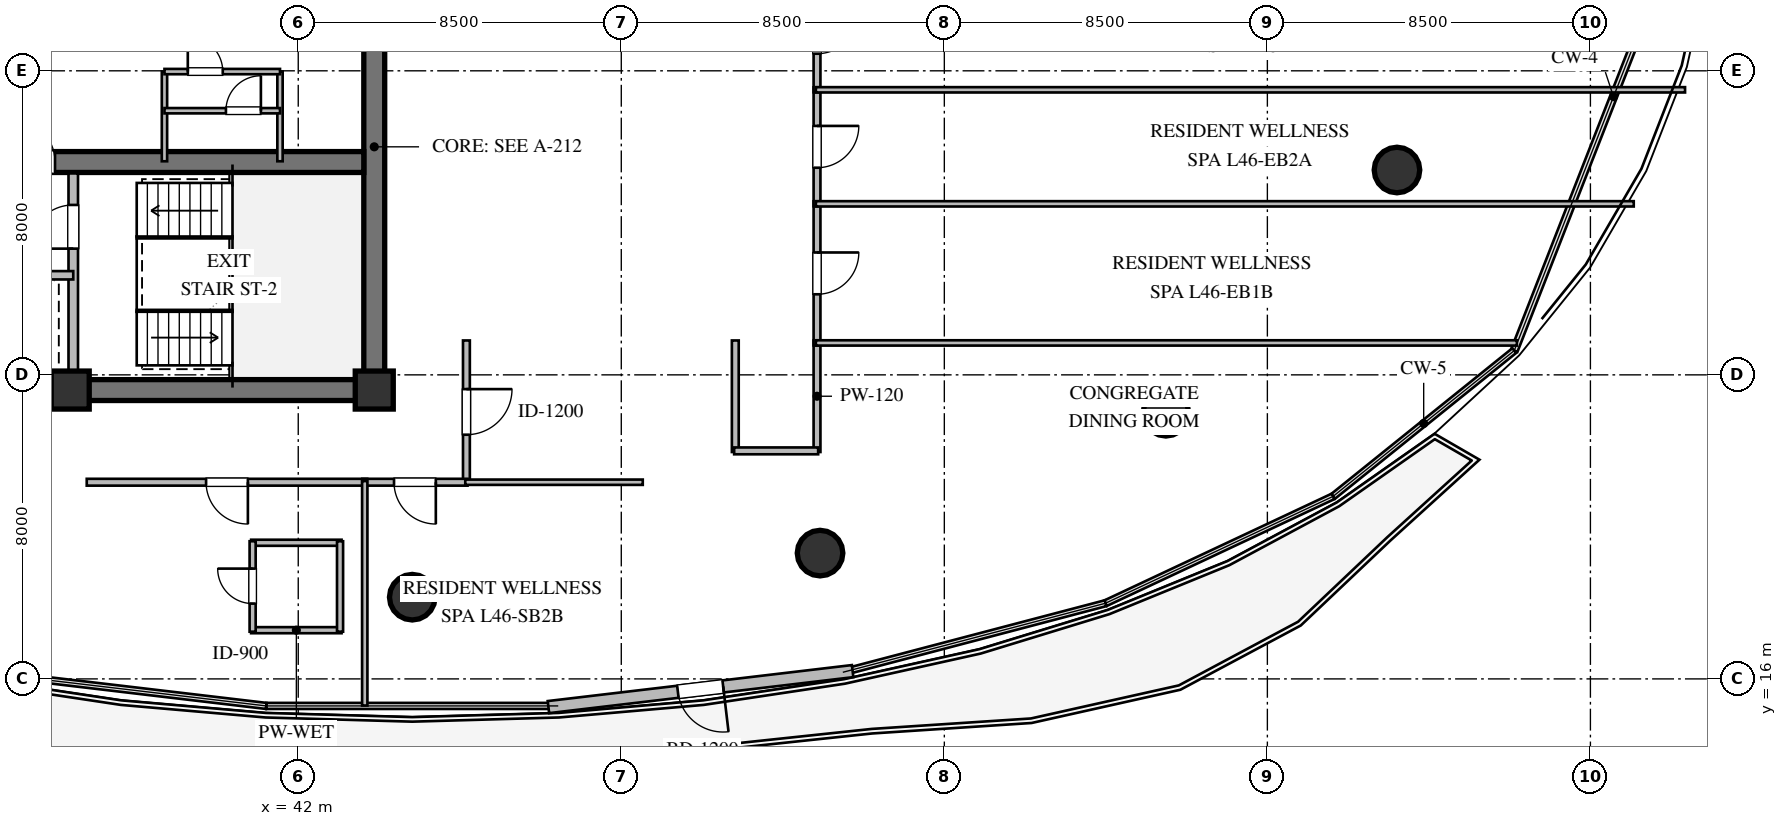
"""IFC4 building model, lengths in metres.
Left out: names, types, materials, properties, quantities, classifications, styles, units other than length and angle.
Written with IfcOpenShell. Run it as: python <this file> out.ifc"""

import sys

from ifc_helpers import new_model, si_unit, direction, frame, frame_2d, origin, origin_2d, place, context, subcontext, project, spatial, rectangle, circle, extrude, element, fill, save


model = new_model("IFC4")
c1 = context("Model", 3, precision=1e-05, world=origin(), true_north=direction((0.0, 1.0)))
c2 = subcontext(c1, "Body", "Model", "MODEL_VIEW")
j1 = project(units=[si_unit("LENGTHUNIT", "METRE"), si_unit("PLANEANGLEUNIT", "RADIAN")], contexts=[c1])
p1 = place(None, origin())
s1 = spatial("IfcSite", under=j1, at=p1, CompositionType="ELEMENT")
p2 = place(p1, origin())
s2 = spatial("IfcBuilding", under=s1, at=p2, CompositionType="ELEMENT")
p3 = place(p2, frame((0.0, 0.0, 174.6)))
s3 = spatial("IfcBuildingStorey", under=s2, at=p3, CompositionType="ELEMENT", Elevation=174.6)
p4 = place(p3, frame((21.725, 23.6, 0.0), z_axis=(0.0, 0.0, 1.0), x_axis=(1.0, 0.0, 0.0)))
e1 = element("IfcWall", 1, at=p4, inside=s3, PredefinedType="SHEAR", context=c2, shape_type="SweptSolid", body=[
    extrude(rectangle(XDim=22.55, YDim=0.55, at=frame_2d((11.275, 0.0))), origin(), (0.0, 0.0, 1.0), 3.36),
])
p5 = place(p3, frame((44.0, 23.875, 0.0), z_axis=(0.0, 0.0, 1.0), x_axis=(0.0, 1.0, 0.0)))
e2 = element("IfcWall", 2, at=p5, inside=s3, PredefinedType="SHEAR", context=c2, shape_type="SweptSolid", body=[
    extrude(rectangle(XDim=12.25, YDim=0.55, at=frame_2d((6.125, 0.0))), origin(), (0.0, 0.0, 1.0), 3.36),
])
p6 = place(p5, frame((8.725, 0.0, 0.0)))
e3 = element("IfcOpeningElement", 3, at=p6, cuts=e2, PredefinedType="OPENING", context=c2, shape_type="SweptSolid", body=[
    extrude(rectangle(XDim=1.5, YDim=2.15, at=frame_2d((0.75, 1.075))), frame((0.0, 0.285, 0.0), z_axis=(0.0, -1.0, 0.0), x_axis=(1.0, 0.0, 0.0)), (0.0, 0.0, 1.0), 0.57),
])
p7 = place(p3, frame((22.275, 29.6, 0.0), z_axis=(0.0, 0.0, 1.0), x_axis=(1.0, 0.0, 0.0)))
e4 = element("IfcWall", 4, at=p7, inside=s3, PredefinedType="SHEAR", context=c2, shape_type="SweptSolid", body=[
    extrude(rectangle(XDim=21.45, YDim=0.55, at=frame_2d((10.725, 0.0))), origin(), (0.0, 0.0, 1.0), 3.36),
])
p8 = place(p7, frame((12.175, 0.0, 0.0)))
e5 = element("IfcOpeningElement", 5, at=p8, cuts=e4, PredefinedType="OPENING", context=c2, shape_type="SweptSolid", body=[
    extrude(rectangle(XDim=1.15, YDim=2.1, at=frame_2d((0.575, 1.05))), frame((0.0, 0.285, 0.0), z_axis=(0.0, -1.0, 0.0), x_axis=(1.0, 0.0, 0.0)), (0.0, 0.0, 1.0), 0.57),
])
for number, where, z_axis, x_axis in (
    (6, (36.0, 23.6, 0.0), (0.0, 0.0, 1.0), (1.0, 0.0, 0.0)),
    (7, (44.0, 23.6, 0.0), (0.0, 0.0, 1.0), (1.0, 0.0, 0.0)),
):
    element("IfcColumn", number, at=place(p3, frame(where, z_axis=z_axis, x_axis=x_axis)), inside=s3, PredefinedType="COLUMN", context=c2, shape_type="SweptSolid", body=[
        extrude(rectangle(XDim=1.0, YDim=1.0, at=origin_2d()), origin(), (0.0, 0.0, 1.0), 3.6),
    ])
for number, where, z_axis, x_axis in (
    (8, (45.0, 18.15, 0.0), (0.0, 0.0, 1.0), (1.0, 0.0, 0.0)),
    (9, (55.73, 19.31, 0.0), (0.0, 0.0, 1.0), (1.0, 0.0, 0.0)),
    (10, (64.83, 22.99, 0.0), (0.0, 0.0, 1.0), (1.0, 0.0, 0.0)),
    (11, (70.91, 29.39, 0.0), (0.0, 0.0, 1.0), (1.0, 0.0, 0.0)),
):
    element("IfcColumn", number, at=place(p3, frame(where, z_axis=z_axis, x_axis=x_axis)), inside=s3, PredefinedType="COLUMN", context=c2, shape_type="SweptSolid", body=[
        extrude(circle(Radius=0.6, at=origin_2d()), origin(), (0.0, 0.0, 1.0), 3.6),
    ])
p9 = place(p3, frame((56.587, 16.205, 0.0), z_axis=(0.0, 0.0, 1.0), x_axis=(-0.993072847957, -0.117500292131, 0.0)))
e12 = element("IfcWall", 12, at=p9, inside=s3, PredefinedType="STANDARD", context=c2, shape_type="SweptSolid", body=[
    extrude(rectangle(XDim=8.06, YDim=0.32, at=frame_2d((4.03, 0.0))), origin(), (0.0, 0.0, 1.0), 3.36),
])
p10 = place(p9, frame((3.43, 0.0, 0.0)))
e13 = element("IfcOpeningElement", 13, at=p10, cuts=e12, PredefinedType="OPENING", context=c2, shape_type="SweptSolid", body=[
    extrude(rectangle(XDim=1.2, YDim=2.15, at=frame_2d((0.6, 1.075))), frame((0.0, 0.17, 0.0), z_axis=(0.0, -1.0, 0.0), x_axis=(1.0, 0.0, 0.0)), (0.0, 0.0, 1.0), 0.34),
])
p11 = place(p3, frame((36.08, 23.9, 0.0), z_axis=(0.0, 0.0, 1.0), x_axis=(0.0, 1.0, 0.0)))
e14 = element("IfcWall", 14, at=p11, inside=s3, PredefinedType="SOLIDWALL", context=c2, shape_type="SweptSolid", body=[
    extrude(rectangle(XDim=5.4, YDim=0.25, at=frame_2d((2.7, 0.0))), origin(), (0.0, 0.0, 1.0), 3.36),
])
p12 = place(p11, frame((3.421, 0.0, 0.0)))
e15 = element("IfcOpeningElement", 15, at=p12, cuts=e14, PredefinedType="OPENING", context=c2, shape_type="SweptSolid", body=[
    extrude(rectangle(XDim=1.15, YDim=2.1, at=frame_2d((0.575, 1.05))), frame((0.0, 0.135, 0.0), z_axis=(0.0, -1.0, 0.0), x_axis=(1.0, 0.0, 0.0)), (0.0, 0.0, 1.0), 0.27),
])
p13 = place(p3, frame((29.92, 26.62, 0.0), z_axis=(0.0, 0.0, 1.0), x_axis=(1.0, 0.0, 0.0)))
e16 = element("IfcWall", 16, at=p13, inside=s3, PredefinedType="SOLIDWALL", context=c2, shape_type="SweptSolid", body=[
    extrude(rectangle(XDim=6.16, YDim=0.22, at=frame_2d((3.08, 0.0))), origin(), (0.0, 0.0, 1.0), 3.36),
])
p14 = place(p13, frame((0.99, 0.0, 0.0)))
e17 = element("IfcOpeningElement", 17, at=p14, cuts=e16, PredefinedType="OPENING", context=c2, shape_type="SweptSolid", body=[
    extrude(rectangle(XDim=1.1, YDim=2.1, at=frame_2d((0.55, 1.05))), frame((0.0, 0.12, 0.0), z_axis=(0.0, -1.0, 0.0), x_axis=(1.0, 0.0, 0.0)), (0.0, 0.0, 1.0), 0.24),
])
p15 = place(p13, frame((4.07, 0.0, 0.0)))
e18 = element("IfcOpeningElement", 18, at=p15, cuts=e16, PredefinedType="OPENING", context=c2, shape_type="SweptSolid", body=[
    extrude(rectangle(XDim=1.1, YDim=2.1, at=frame_2d((0.55, 1.05))), frame((0.0, 0.12, 0.0), z_axis=(0.0, -1.0, 0.0), x_axis=(1.0, 0.0, 0.0)), (0.0, 0.0, 1.0), 0.24),
])
for number, where, z_axis, x_axis in (
    (19, (38.48, 29.62, 0.0), (0.0, 0.0, 1.0), (0.0, 1.0, 0.0)),
    (20, (41.52, 29.62, 0.0), (0.0, 0.0, 1.0), (0.0, 1.0, 0.0)),
):
    element("IfcWall", number, at=place(p3, frame(where, z_axis=z_axis, x_axis=x_axis)), inside=s3, PredefinedType="PARTITIONING", context=c2, shape_type="SweptSolid", body=[
        extrude(rectangle(XDim=2.36, YDim=0.14, at=frame_2d((1.18, 0.0))), origin(), (0.0, 0.0, 1.0), 3.36),
    ])
p16 = place(p3, frame((38.48, 30.95, 0.0), z_axis=(0.0, 0.0, 1.0), x_axis=(1.0, 0.0, 0.0)))
e21 = element("IfcWall", 21, at=p16, inside=s3, PredefinedType="PARTITIONING", context=c2, shape_type="SweptSolid", body=[
    extrude(rectangle(XDim=3.04, YDim=0.14, at=frame_2d((1.52, 0.0))), origin(), (0.0, 0.0, 1.0), 3.36),
])
p17 = place(p16, frame((1.617, 0.0, 0.0)))
e22 = element("IfcOpeningElement", 22, at=p17, cuts=e21, PredefinedType="OPENING", context=c2, shape_type="SweptSolid", body=[
    extrude(rectangle(XDim=0.92, YDim=2.1, at=frame_2d((0.46, 1.05))), frame((0.0, 0.08, 0.0), z_axis=(0.0, -1.0, 0.0), x_axis=(1.0, 0.0, 0.0)), (0.0, 0.0, 1.0), 0.16),
])
p18 = place(p3, frame((38.48, 31.98, 0.0), z_axis=(0.0, 0.0, 1.0), x_axis=(1.0, 0.0, 0.0)))
e23 = element("IfcWall", 23, at=p18, inside=s3, PredefinedType="PARTITIONING", context=c2, shape_type="SweptSolid", body=[
    extrude(rectangle(XDim=3.04, YDim=0.14, at=frame_2d((1.52, 0.0))), origin(), (0.0, 0.0, 1.0), 3.36),
])
p19 = place(p18, frame((0.614, 0.0, 0.0)))
e24 = element("IfcOpeningElement", 24, at=p19, cuts=e23, PredefinedType="OPENING", context=c2, shape_type="SweptSolid", body=[
    extrude(rectangle(XDim=0.92, YDim=2.1, at=frame_2d((0.46, 1.05))), frame((0.0, 0.08, 0.0), z_axis=(0.0, -1.0, 0.0), x_axis=(1.0, 0.0, 0.0)), (0.0, 0.0, 1.0), 0.16),
])
for number, where, z_axis, x_axis in (
    (25, (40.76, 17.282, 0.0), (0.0, 0.0, 1.0), (1.0, 0.0, 0.0)),
    (26, (40.76, 19.582, 0.0), (0.0, 0.0, 1.0), (1.0, 0.0, 0.0)),
):
    element("IfcWall", number, at=place(p3, frame(where, z_axis=z_axis, x_axis=x_axis)), inside=s3, PredefinedType="PLUMBINGWALL", context=c2, shape_type="SweptSolid", body=[
        extrude(rectangle(XDim=2.38, YDim=0.16, at=frame_2d((1.19, 0.0))), origin(), (0.0, 0.0, 1.0), 3.36),
    ])
p20 = place(p3, frame((40.8, 17.242, 0.0), z_axis=(0.0, 0.0, 1.0), x_axis=(0.0, 1.0, 0.0)))
e27 = element("IfcWall", 27, at=p20, inside=s3, PredefinedType="PLUMBINGWALL", context=c2, shape_type="SweptSolid", body=[
    extrude(rectangle(XDim=2.38, YDim=0.16, at=frame_2d((1.19, 0.0))), origin(), (0.0, 0.0, 1.0), 3.36),
])
p21 = place(p20, frame((0.74, 0.0, 0.0)))
e28 = element("IfcOpeningElement", 28, at=p21, cuts=e27, PredefinedType="OPENING", context=c2, shape_type="SweptSolid", body=[
    extrude(rectangle(XDim=0.92, YDim=2.1, at=frame_2d((0.46, 1.05))), frame((0.0, 0.09, 0.0), z_axis=(0.0, -1.0, 0.0), x_axis=(1.0, 0.0, 0.0)), (0.0, 0.0, 1.0), 0.18),
])
p22 = place(p3, frame((43.1, 17.242, 0.0), z_axis=(0.0, 0.0, 1.0), x_axis=(0.0, 1.0, 0.0)))
e29 = element("IfcWall", 29, at=p22, inside=s3, PredefinedType="PLUMBINGWALL", context=c2, shape_type="SweptSolid", body=[
    extrude(rectangle(XDim=2.38, YDim=0.16, at=frame_2d((1.19, 0.0))), origin(), (0.0, 0.0, 1.0), 3.36),
])
p23 = place(p3, frame((46.425, 24.905, 0.0), z_axis=(0.0, 0.0, 1.0), x_axis=(0.0, -1.0, 0.0)))
e30 = element("IfcWall", 30, at=p23, inside=s3, PredefinedType="PARTITIONING", context=c2, shape_type="SweptSolid", body=[
    extrude(rectangle(XDim=3.76, YDim=0.18, at=frame_2d((1.88, 0.0))), origin(), (0.0, 0.0, 1.0), 3.36),
])
p24 = place(p23, frame((1.28, 0.0, 0.0)))
e31 = element("IfcOpeningElement", 31, at=p24, cuts=e30, PredefinedType="OPENING", context=c2, shape_type="SweptSolid", body=[
    extrude(rectangle(XDim=1.2, YDim=2.15, at=frame_2d((0.6, 1.075))), frame((0.0, 0.1, 0.0), z_axis=(0.0, -1.0, 0.0), x_axis=(1.0, 0.0, 0.0)), (0.0, 0.0, 1.0), 0.2),
])
for number, where, z_axis, x_axis in (
    (32, (55.65, 24.905, 0.0), (0.0, 0.0, 1.0), (0.0, -1.0, 0.0)),
    (33, (53.5, 21.97, 0.0), (0.0, 0.0, 1.0), (0.0, 1.0, 0.0)),
):
    element("IfcWall", number, at=place(p3, frame(where, z_axis=z_axis, x_axis=x_axis)), inside=s3, PredefinedType="PARTITIONING", context=c2, shape_type="SweptSolid", body=[
        extrude(rectangle(XDim=2.935, YDim=0.18, at=frame_2d((1.468, 0.0))), origin(), (0.0, 0.0, 1.0), 3.36),
    ])
p25 = place(p3, frame((55.68, 22.0, 0.0), z_axis=(0.0, 0.0, 1.0), x_axis=(-1.0, 0.0, 0.0)))
e34 = element("IfcWall", 34, at=p25, inside=s3, PredefinedType="PARTITIONING", context=c2, shape_type="SweptSolid", body=[
    extrude(rectangle(XDim=2.21, YDim=0.18, at=frame_2d((1.105, 0.0))), origin(), (0.0, 0.0, 1.0), 3.36),
])
p26 = place(p3, frame((55.65, 28.565, 0.0), z_axis=(0.0, 0.0, 1.0), x_axis=(0.0, -1.0, 0.0)))
e35 = element("IfcWall", 35, at=p26, inside=s3, PredefinedType="PARTITIONING", context=c2, shape_type="SweptSolid", body=[
    extrude(rectangle(XDim=3.79, YDim=0.18, at=frame_2d((1.895, 0.0))), origin(), (0.0, 0.0, 1.0), 3.36),
])
p27 = place(p26, frame((1.345, 0.0, 0.0)))
e36 = element("IfcOpeningElement", 36, at=p27, cuts=e35, PredefinedType="OPENING", context=c2, shape_type="SweptSolid", body=[
    extrude(rectangle(XDim=1.1, YDim=2.1, at=frame_2d((0.55, 1.05))), frame((0.0, 0.1, 0.0), z_axis=(0.0, -1.0, 0.0), x_axis=(1.0, 0.0, 0.0)), (0.0, 0.0, 1.0), 0.2),
])
p28 = place(p3, frame((55.65, 31.565, 0.0), z_axis=(0.0, 0.0, 1.0), x_axis=(0.0, -1.0, 0.0)))
e37 = element("IfcWall", 37, at=p28, inside=s3, PredefinedType="PARTITIONING", context=c2, shape_type="SweptSolid", body=[
    extrude(rectangle(XDim=3.13, YDim=0.18, at=frame_2d((1.565, 0.0))), origin(), (0.0, 0.0, 1.0), 3.36),
])
p29 = place(p28, frame((1.015, 0.0, 0.0)))
e38 = element("IfcOpeningElement", 38, at=p29, cuts=e37, PredefinedType="OPENING", context=c2, shape_type="SweptSolid", body=[
    extrude(rectangle(XDim=1.1, YDim=2.1, at=frame_2d((0.55, 1.05))), frame((0.0, 0.1, 0.0), z_axis=(0.0, -1.0, 0.0), x_axis=(1.0, 0.0, 0.0)), (0.0, 0.0, 1.0), 0.2),
])
p30 = place(p3, frame((55.65, 34.565, 0.0), z_axis=(0.0, 0.0, 1.0), x_axis=(0.0, -1.0, 0.0)))
e39 = element("IfcWall", 39, at=p30, inside=s3, PredefinedType="PARTITIONING", context=c2, shape_type="SweptSolid", body=[
    extrude(rectangle(XDim=3.13, YDim=0.18, at=frame_2d((1.565, 0.0))), origin(), (0.0, 0.0, 1.0), 3.36),
])
p31 = place(p30, frame((1.015, 0.0, 0.0)))
e40 = element("IfcOpeningElement", 40, at=p31, cuts=e39, PredefinedType="OPENING", context=c2, shape_type="SweptSolid", body=[
    extrude(rectangle(XDim=1.1, YDim=2.1, at=frame_2d((0.55, 1.05))), frame((0.0, 0.1, 0.0), z_axis=(0.0, -1.0, 0.0), x_axis=(1.0, 0.0, 0.0)), (0.0, 0.0, 1.0), 0.2),
])
p32 = place(p3, frame((43.815, 21.175, 0.0), z_axis=(0.0, 0.0, 1.0), x_axis=(-1.0, 0.0, 0.0)))
e41 = element("IfcWall", 41, at=p32, inside=s3, PredefinedType="PARTITIONING", context=c2, shape_type="SweptSolid", body=[
    extrude(rectangle(XDim=7.38, YDim=0.18, at=frame_2d((3.69, 0.0))), origin(), (0.0, 0.0, 1.0), 2.996),
])
p33 = place(p32, frame((3.14, 0.0, 0.0)))
e42 = element("IfcOpeningElement", 42, at=p33, cuts=e41, PredefinedType="OPENING", context=c2, shape_type="SweptSolid", body=[
    extrude(rectangle(XDim=1.1, YDim=2.1, at=frame_2d((0.55, 1.05))), frame((0.0, 0.1, 0.0), z_axis=(0.0, -1.0, 0.0), x_axis=(1.0, 0.0, 0.0)), (0.0, 0.0, 1.0), 0.2),
])
p34 = place(p3, frame((46.455, 21.175, 0.0), z_axis=(0.0, 0.0, 1.0), x_axis=(-1.0, 0.0, 0.0)))
e43 = element("IfcWall", 43, at=p34, inside=s3, PredefinedType="PARTITIONING", context=c2, shape_type="SweptSolid", body=[
    extrude(rectangle(XDim=2.77, YDim=0.18, at=frame_2d((1.385, 0.0))), origin(), (0.0, 0.0, 1.0), 2.996),
])
p35 = place(p34, frame((0.835, 0.0, 0.0)))
e44 = element("IfcOpeningElement", 44, at=p35, cuts=e43, PredefinedType="OPENING", context=c2, shape_type="SweptSolid", body=[
    extrude(rectangle(XDim=1.1, YDim=2.1, at=frame_2d((0.55, 1.05))), frame((0.0, 0.1, 0.0), z_axis=(0.0, -1.0, 0.0), x_axis=(1.0, 0.0, 0.0)), (0.0, 0.0, 1.0), 0.2),
])
p36 = place(p3, frame((55.62, 24.84, 0.0), z_axis=(0.0, 0.0, 1.0), x_axis=(1.0, 0.0, 0.0)))
e45 = element("IfcWall", 45, at=p36, inside=s3, PredefinedType="PARTITIONING", context=c2, shape_type="SweptSolid", body=[
    extrude(rectangle(XDim=18.445, YDim=0.14, at=frame_2d((9.222, 0.0))), origin(), (0.0, 0.0, 1.0), 3.36),
])
p37 = place(p3, frame((51.065, 21.175, 0.0), z_axis=(0.0, 0.0, 1.0), x_axis=(-1.0, 0.0, 0.0)))
e46 = element("IfcWall", 46, at=p37, inside=s3, PredefinedType="PARTITIONING", context=c2, shape_type="SweptSolid", body=[
    extrude(rectangle(XDim=4.67, YDim=0.14, at=frame_2d((2.335, 0.0))), origin(), (0.0, 0.0, 1.0), 2.996),
])
p38 = place(p3, frame((55.62, 28.5, 0.0), z_axis=(0.0, 0.0, 1.0), x_axis=(1.0, 0.0, 0.0)))
e47 = element("IfcWall", 47, at=p38, inside=s3, PredefinedType="PARTITIONING", context=c2, shape_type="SweptSolid", body=[
    extrude(rectangle(XDim=21.52, YDim=0.14, at=frame_2d((10.76, 0.0))), origin(), (0.0, 0.0, 1.0), 2.806),
])
p39 = place(p3, frame((55.62, 31.5, 0.0), z_axis=(0.0, 0.0, 1.0), x_axis=(1.0, 0.0, 0.0)))
e48 = element("IfcWall", 48, at=p39, inside=s3, PredefinedType="PARTITIONING", context=c2, shape_type="SweptSolid", body=[
    extrude(rectangle(XDim=22.87, YDim=0.14, at=frame_2d((11.435, 0.0))), origin(), (0.0, 0.0, 1.0), 3.36),
])
p40 = place(p3, frame((43.75, 21.205, 0.0), z_axis=(0.0, 0.0, 1.0), x_axis=(0.0, -1.0, 0.0)))
e49 = element("IfcWall", 49, at=p40, inside=s3, PredefinedType="PARTITIONING", context=c2, shape_type="SweptSolid", body=[
    extrude(rectangle(XDim=5.906, YDim=0.14, at=frame_2d((2.953, 0.0))), origin(), (0.0, 0.0, 1.0), 3.36),
])
p41 = place(p10, origin())
e50 = element("IfcDoor", 50, at=p41, inside=s3, OperationType="SINGLE_SWING_LEFT", PredefinedType="DOOR", context=c2, shape_type="SweptSolid", body=[
    extrude(rectangle(XDim=1.2, YDim=2.15, at=frame_2d((0.6, 1.075))), frame((0.0, 0.025, 0.0), z_axis=(0.0, -1.0, 0.0), x_axis=(1.0, 0.0, 0.0)), (0.0, 0.0, 1.0), 0.05),
])
fill(e13, e50)
p42 = place(p12, origin())
e51 = element("IfcDoor", 51, at=p42, inside=s3, OperationType="SINGLE_SWING_LEFT", PredefinedType="DOOR", context=c2, shape_type="SweptSolid", body=[
    extrude(rectangle(XDim=1.15, YDim=2.1, at=frame_2d((0.575, 1.05))), frame((0.0, 0.025, 0.0), z_axis=(0.0, -1.0, 0.0), x_axis=(1.0, 0.0, 0.0)), (0.0, 0.0, 1.0), 0.05),
])
fill(e15, e51)
p43 = place(p8, origin())
e52 = element("IfcDoor", 52, at=p43, inside=s3, OperationType="SINGLE_SWING_LEFT", PredefinedType="DOOR", context=c2, shape_type="SweptSolid", body=[
    extrude(rectangle(XDim=1.15, YDim=2.1, at=frame_2d((0.575, 1.05))), frame((0.0, 0.025, 0.0), z_axis=(0.0, -1.0, 0.0), x_axis=(1.0, 0.0, 0.0)), (0.0, 0.0, 1.0), 0.05),
])
fill(e5, e52)
p44 = place(p19, origin())
e53 = element("IfcDoor", 53, at=p44, inside=s3, OperationType="SINGLE_SWING_LEFT", PredefinedType="DOOR", context=c2, shape_type="SweptSolid", body=[
    extrude(rectangle(XDim=0.92, YDim=2.1, at=frame_2d((0.46, 1.05))), frame((0.0, 0.025, 0.0), z_axis=(0.0, -1.0, 0.0), x_axis=(1.0, 0.0, 0.0)), (0.0, 0.0, 1.0), 0.05),
])
fill(e24, e53)
p45 = place(p17, origin())
e54 = element("IfcDoor", 54, at=p45, inside=s3, OperationType="SINGLE_SWING_RIGHT", PredefinedType="DOOR", context=c2, shape_type="SweptSolid", body=[
    extrude(rectangle(XDim=0.92, YDim=2.1, at=frame_2d((0.46, 1.05))), frame((0.0, 0.025, 0.0), z_axis=(0.0, -1.0, 0.0), x_axis=(1.0, 0.0, 0.0)), (0.0, 0.0, 1.0), 0.05),
])
fill(e22, e54)
p46 = place(p21, origin())
e55 = element("IfcDoor", 55, at=p46, inside=s3, OperationType="SINGLE_SWING_RIGHT", PredefinedType="DOOR", context=c2, shape_type="SweptSolid", body=[
    extrude(rectangle(XDim=0.92, YDim=2.1, at=frame_2d((0.46, 1.05))), frame((0.0, 0.025, 0.0), z_axis=(0.0, -1.0, 0.0), x_axis=(1.0, 0.0, 0.0)), (0.0, 0.0, 1.0), 0.05),
])
fill(e28, e55)
p47 = place(p24, origin())
e56 = element("IfcDoor", 56, at=p47, inside=s3, OperationType="SINGLE_SWING_LEFT", PredefinedType="DOOR", context=c2, shape_type="SweptSolid", body=[
    extrude(rectangle(XDim=1.2, YDim=2.15, at=frame_2d((0.6, 1.075))), frame((0.0, 0.025, 0.0), z_axis=(0.0, -1.0, 0.0), x_axis=(1.0, 0.0, 0.0)), (0.0, 0.0, 1.0), 0.05),
])
fill(e31, e56)
p48 = place(p27, origin())
e57 = element("IfcDoor", 57, at=p48, inside=s3, OperationType="SINGLE_SWING_LEFT", PredefinedType="DOOR", context=c2, shape_type="SweptSolid", body=[
    extrude(rectangle(XDim=1.1, YDim=2.1, at=frame_2d((0.55, 1.05))), frame((0.0, 0.025, 0.0), z_axis=(0.0, -1.0, 0.0), x_axis=(1.0, 0.0, 0.0)), (0.0, 0.0, 1.0), 0.05),
])
fill(e36, e57)
p49 = place(p29, origin())
e58 = element("IfcDoor", 58, at=p49, inside=s3, OperationType="SINGLE_SWING_LEFT", PredefinedType="DOOR", context=c2, shape_type="SweptSolid", body=[
    extrude(rectangle(XDim=1.1, YDim=2.1, at=frame_2d((0.55, 1.05))), frame((0.0, 0.025, 0.0), z_axis=(0.0, -1.0, 0.0), x_axis=(1.0, 0.0, 0.0)), (0.0, 0.0, 1.0), 0.05),
])
fill(e38, e58)
p50 = place(p31, origin())
e59 = element("IfcDoor", 59, at=p50, inside=s3, OperationType="SINGLE_SWING_LEFT", PredefinedType="DOOR", context=c2, shape_type="SweptSolid", body=[
    extrude(rectangle(XDim=1.1, YDim=2.1, at=frame_2d((0.55, 1.05))), frame((0.0, 0.025, 0.0), z_axis=(0.0, -1.0, 0.0), x_axis=(1.0, 0.0, 0.0)), (0.0, 0.0, 1.0), 0.05),
])
fill(e40, e59)
p51 = place(p33, origin())
e60 = element("IfcDoor", 60, at=p51, inside=s3, OperationType="SINGLE_SWING_LEFT", PredefinedType="DOOR", context=c2, shape_type="SweptSolid", body=[
    extrude(rectangle(XDim=1.1, YDim=2.1, at=frame_2d((0.55, 1.05))), frame((0.0, 0.025, 0.0), z_axis=(0.0, -1.0, 0.0), x_axis=(1.0, 0.0, 0.0)), (0.0, 0.0, 1.0), 0.05),
])
fill(e42, e60)
p52 = place(p35, origin())
e61 = element("IfcDoor", 61, at=p52, inside=s3, OperationType="SINGLE_SWING_LEFT", PredefinedType="DOOR", context=c2, shape_type="SweptSolid", body=[
    extrude(rectangle(XDim=1.1, YDim=2.1, at=frame_2d((0.55, 1.05))), frame((0.0, 0.025, 0.0), z_axis=(0.0, -1.0, 0.0), x_axis=(1.0, 0.0, 0.0)), (0.0, 0.0, 1.0), 0.05),
])
fill(e44, e61)
save(model, sys.argv[1])
